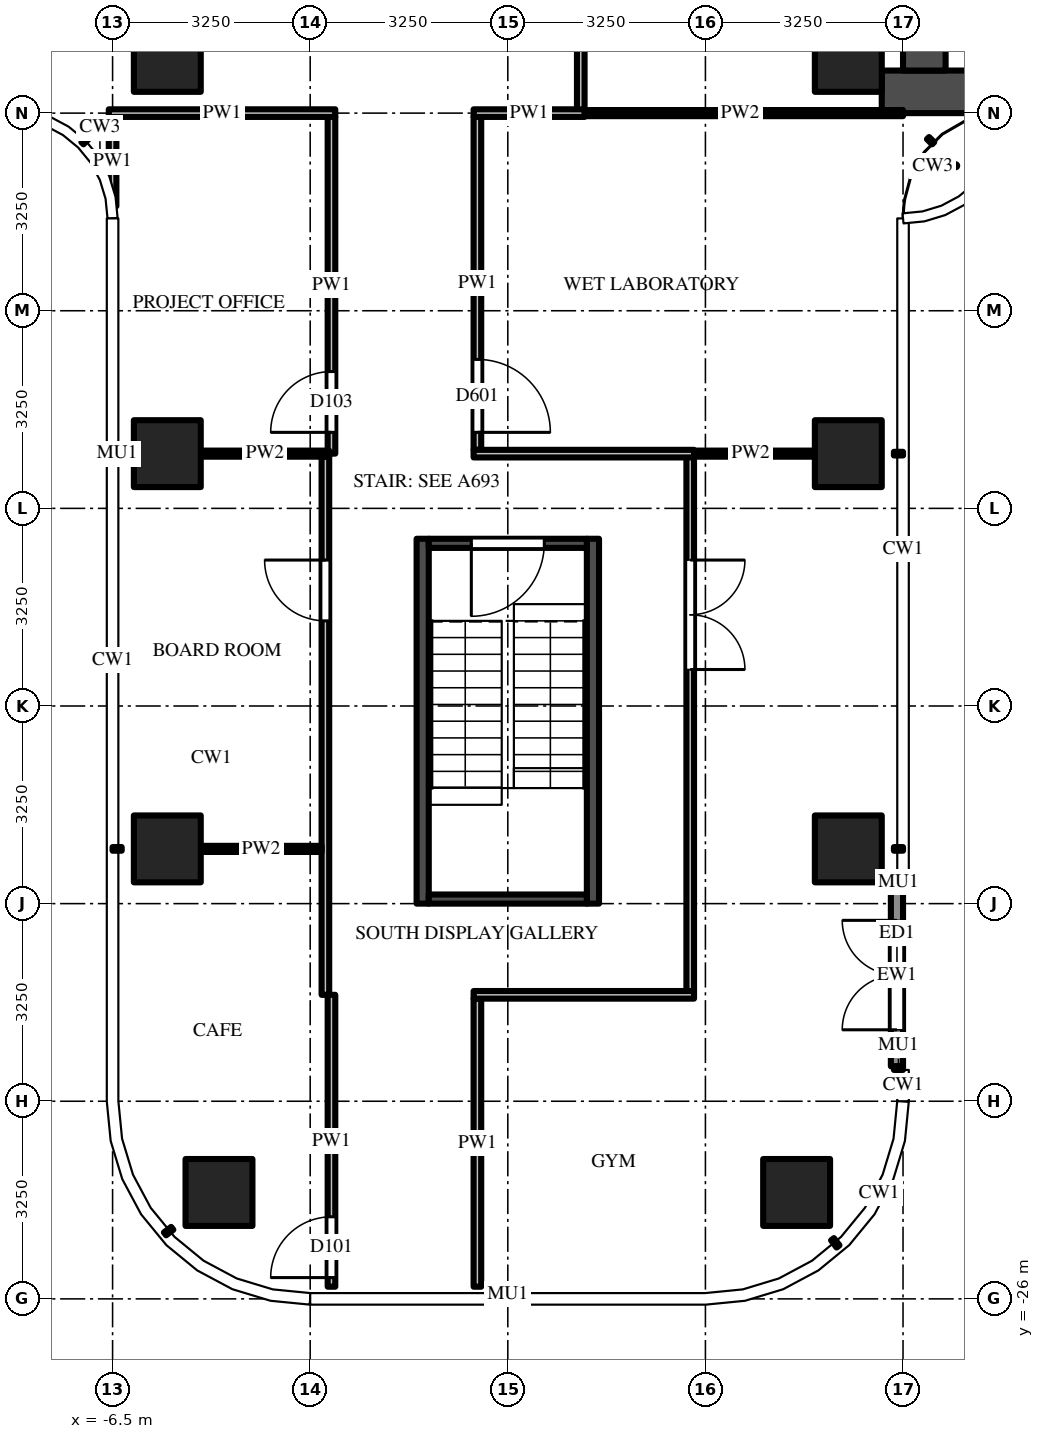
"""IFC4 building model, lengths in metres.
Left out: names, types, materials, properties, quantities, classifications, styles, units other than length and angle.
Written with IfcOpenShell. Run it as: python <this file> out.ifc"""

import sys

from ifc_helpers import new_model, si_unit, direction, frame, frame_2d, origin, origin_2d, place, context, subcontext, project, spatial, rectangle, extrude, source, transform, mapped, element, fill, save


model = new_model("IFC4")
c1 = context("Model", 3, precision=1e-05, world=origin(), true_north=direction((0.0, 1.0)))
c2 = subcontext(c1, "Body", "Model", "MODEL_VIEW")
j1 = project(units=[si_unit("LENGTHUNIT", "METRE"), si_unit("PLANEANGLEUNIT", "RADIAN")], contexts=[c1])
p1 = place(None, origin())
s1 = spatial("IfcSite", under=j1, at=p1, CompositionType="ELEMENT")
p2 = place(p1, origin())
s2 = spatial("IfcBuilding", under=s1, at=p2, CompositionType="ELEMENT")
p3 = place(p2, frame((0.0, 0.0, 236.3)))
s3 = spatial("IfcBuildingStorey", under=s2, at=p3, CompositionType="ELEMENT", Elevation=236.3)
m1 = source(origin(), c2, "Body", "SweptSolid", [
    extrude(rectangle(XDim=1.1, YDim=1.1, at=origin_2d()), origin(), (0.0, 0.0, 1.0), 3.9),
])
for number, where, z_axis, x_axis in (
    (1, (5.6, -5.6, 0.0), (0.0, 0.0, 1.0), (1.0, 0.0, 0.0)),
    (2, (-5.6, -5.6, 0.0), (0.0, 0.0, 1.0), (1.0, 0.0, 0.0)),
    (3, (5.6, -12.1, 0.0), (0.0, 0.0, 1.0), (1.0, 0.0, 0.0)),
    (4, (5.6, -18.6, 0.0), (0.0, 0.0, 1.0), (1.0, 0.0, 0.0)),
    (5, (4.75, -24.25, 0.0), (0.0, 0.0, 1.0), (1.0, 0.0, 0.0)),
    (6, (-5.6, -12.1, 0.0), (0.0, 0.0, 1.0), (1.0, 0.0, 0.0)),
    (7, (-5.6, -18.6, 0.0), (0.0, 0.0, 1.0), (1.0, 0.0, 0.0)),
    (8, (-4.75, -24.25, 0.0), (0.0, 0.0, 1.0), (1.0, 0.0, 0.0)),
):
    element("IfcColumn", number, at=place(p3, frame(where, z_axis=z_axis, x_axis=x_axis)), inside=s3, PredefinedType="COLUMN", context=c2, shape_type="MappedRepresentation", body=[
        mapped(m1, transform((0.0, 0.0, 0.0))),
    ])
m2 = source(origin(), c2, "Body", "SweptSolid", [
    extrude(rectangle(XDim=16.6, YDim=0.7, at=frame_2d((8.3, 0.0))), origin(), (0.0, 0.0, 1.0), 3.7),
])
p4 = place(p3, frame((6.15, -6.15, 0.0), z_axis=(0.0, 0.0, 1.0), x_axis=(1.0, 0.0, 0.0)))
e9 = element("IfcWall", 9, at=p4, inside=s3, PredefinedType="SHEAR", context=c2, shape_type="MappedRepresentation", body=[
    mapped(m2, transform((0.0, 0.0, 0.0))),
])
m3 = source(origin(), c2, "Body", "SweptSolid", [
    extrude(rectangle(XDim=9.05, YDim=0.7, at=frame_2d((4.525, 0.0))), origin(), (0.0, 0.0, 1.0), 3.7),
])
p5 = place(p3, frame((6.85, -5.8, 0.0), z_axis=(0.0, 0.0, 1.0), x_axis=(0.0, 1.0, 0.0)))
e10 = element("IfcWall", 10, at=p5, inside=s3, PredefinedType="SHEAR", context=c2, shape_type="MappedRepresentation", body=[
    mapped(m3, transform((0.0, 0.0, 0.0))),
])
m4 = source(origin(), c2, "Body", "SweptSolid", [
    extrude(rectangle(XDim=1.8, YDim=2.1, at=frame_2d((0.9, 1.05))), frame((0.0, 0.36, 0.0), z_axis=(0.0, -1.0, 0.0), x_axis=(1.0, 0.0, 0.0)), (0.0, 0.0, 1.0), 0.72),
])
p6 = place(p5, frame((3.15, 0.0, 0.0)))
e11 = element("IfcOpeningElement", 11, at=p6, cuts=e10, PredefinedType="OPENING", context=c2, shape_type="MappedRepresentation", body=[
    mapped(m4, transform((0.0, 0.0, 0.0))),
])
m5 = source(origin(), c2, "Body", "SweptSolid", [
    extrude(rectangle(XDim=6.0, YDim=0.2, at=frame_2d((3.0, 0.0))), origin(), (0.0, 0.0, 1.0), 3.7),
])
for number, where, z_axis, x_axis in (
    (12, (1.4, -13.5, 0.0), (0.0, 0.0, 1.0), (0.0, -1.0, 0.0)),
    (13, (-1.4, -13.5, 0.0), (0.0, 0.0, 1.0), (0.0, -1.0, 0.0)),
):
    element("IfcWall", number, at=place(p3, frame(where, z_axis=z_axis, x_axis=x_axis)), inside=s3, PredefinedType="SHEAR", context=c2, shape_type="MappedRepresentation", body=[
        mapped(m5, transform((0.0, 0.0, 0.0))),
    ])
m6 = source(origin(), c2, "Body", "SweptSolid", [
    extrude(rectangle(XDim=2.6, YDim=0.15, at=frame_2d((1.3, 0.0))), origin(), (0.0, 0.0, 1.0), 3.7),
])
p7 = place(p3, frame((1.3, -13.575, 0.0), z_axis=(0.0, 0.0, 1.0), x_axis=(-1.0, 0.0, 0.0)))
e14 = element("IfcWall", 14, at=p7, inside=s3, PredefinedType="SHEAR", context=c2, shape_type="MappedRepresentation", body=[
    mapped(m6, transform((0.0, 0.0, 0.0))),
])
m7 = source(origin(), c2, "Body", "SweptSolid", [
    extrude(rectangle(XDim=1.2, YDim=2.1, at=frame_2d((0.6, 1.05))), frame((0.0, 0.085, 0.0), z_axis=(0.0, -1.0, 0.0), x_axis=(1.0, 0.0, 0.0)), (0.0, 0.0, 1.0), 0.17),
])
p8 = place(p7, frame((0.7, 0.0, 0.0)))
e15 = element("IfcOpeningElement", 15, at=p8, cuts=e14, PredefinedType="OPENING", context=c2, shape_type="MappedRepresentation", body=[
    mapped(m7, transform((0.0, 0.0, 0.0))),
])
p9 = place(p3, frame((1.3, -19.425, 0.0), z_axis=(0.0, 0.0, 1.0), x_axis=(-1.0, 0.0, 0.0)))
e16 = element("IfcWall", 16, at=p9, inside=s3, PredefinedType="SHEAR", context=c2, shape_type="MappedRepresentation", body=[
    mapped(m6, transform((0.0, 0.0, 0.0))),
])
m8 = source(origin(), c2, "Body", "SweptSolid", [
    extrude(rectangle(XDim=3.0, YDim=0.2, at=frame_2d((1.5, 0.0))), origin(), (0.0, 0.0, 1.0), 3.7),
])
p10 = place(p3, frame((6.4, -22.175, 0.0), z_axis=(0.0, 0.0, 1.0), x_axis=(0.0, 1.0, 0.0)))
e17 = element("IfcWall", 17, at=p10, inside=s3, PredefinedType="SOLIDWALL", context=c2, shape_type="MappedRepresentation", body=[
    mapped(m8, transform((0.0, 0.0, 0.0))),
])
m9 = source(origin(), c2, "Body", "SweptSolid", [
    extrude(rectangle(XDim=1.8, YDim=2.4, at=frame_2d((0.9, 1.2))), frame((0.0, 0.11, 0.0), z_axis=(0.0, -1.0, 0.0), x_axis=(1.0, 0.0, 0.0)), (0.0, 0.0, 1.0), 0.22),
])
p11 = place(p10, frame((0.6, 0.0, 0.0)))
e18 = element("IfcOpeningElement", 18, at=p11, cuts=e17, PredefinedType="OPENING", context=c2, shape_type="MappedRepresentation", body=[
    mapped(m9, transform((0.0, 0.0, 0.0))),
])
m10 = source(origin(), c2, "Body", "SweptSolid", [
    extrude(rectangle(XDim=1.469, YDim=0.125, at=frame_2d((0.734, 0.0))), origin(), (0.0, 0.0, 1.0), 3.7),
])
p12 = place(p3, frame((-6.5, -6.562, 0.0), z_axis=(0.0, 0.0, 1.0), x_axis=(0.0, -1.0, 0.0)))
e19 = element("IfcWall", 19, at=p12, inside=s3, PredefinedType="PARTITIONING", context=c2, shape_type="MappedRepresentation", body=[
    mapped(m10, transform((0.0, 0.0, 0.0))),
])
m11 = source(origin(), c2, "Body", "SweptSolid", [
    extrude(rectangle(XDim=8.85, YDim=0.125, at=frame_2d((4.425, 0.0))), origin(), (0.0, 0.0, 1.0), 2.996),
])
p13 = place(p3, frame((-3.0, -21.0, 0.0), z_axis=(0.0, 0.0, 1.0), x_axis=(0.0, 1.0, 0.0)))
e20 = element("IfcWall", 20, at=p13, inside=s3, PredefinedType="PARTITIONING", context=c2, shape_type="MappedRepresentation", body=[
    mapped(m11, transform((0.0, 0.0, 0.0))),
])
m12 = source(origin(), c2, "Body", "SweptSolid", [
    extrude(rectangle(XDim=1.0, YDim=2.1, at=frame_2d((0.5, 1.05))), frame((0.0, 0.073, 0.0), z_axis=(0.0, -1.0, 0.0), x_axis=(1.0, 0.0, 0.0)), (0.0, 0.0, 1.0), 0.145),
])
p14 = place(p13, frame((6.15, 0.0, 0.0)))
e21 = element("IfcOpeningElement", 21, at=p14, cuts=e20, PredefinedType="OPENING", context=c2, shape_type="MappedRepresentation", body=[
    mapped(m12, transform((0.0, 0.0, 0.0))),
])
m13 = source(origin(), c2, "Body", "SweptSolid", [
    extrude(rectangle(XDim=4.8, YDim=0.125, at=frame_2d((2.4, 0.0))), origin(), (0.0, 0.0, 1.0), 2.78),
])
p15 = place(p3, frame((-2.9, -25.8, 0.0), z_axis=(0.0, 0.0, 1.0), x_axis=(0.0, 1.0, 0.0)))
e22 = element("IfcWall", 22, at=p15, inside=s3, PredefinedType="PARTITIONING", context=c2, shape_type="MappedRepresentation", body=[
    mapped(m13, transform((0.0, 0.0, 0.0))),
])
p16 = place(p15, frame((0.15, 0.0, 0.0)))
e23 = element("IfcOpeningElement", 23, at=p16, cuts=e22, PredefinedType="OPENING", context=c2, shape_type="MappedRepresentation", body=[
    mapped(m12, transform((0.0, 0.0, 0.0))),
])
m14 = source(origin(), c2, "Body", "SweptSolid", [
    extrude(rectangle(XDim=5.538, YDim=0.125, at=frame_2d((2.769, 0.0))), origin(), (0.0, 0.0, 1.0), 2.996),
])
p17 = place(p3, frame((-2.9, -12.1, 0.0), z_axis=(0.0, 0.0, 1.0), x_axis=(0.0, 1.0, 0.0)))
e24 = element("IfcWall", 24, at=p17, inside=s3, PredefinedType="PARTITIONING", context=c2, shape_type="MappedRepresentation", body=[
    mapped(m14, transform((0.0, 0.0, 0.0))),
])
p18 = place(p17, frame((0.35, 0.0, 0.0)))
e25 = element("IfcOpeningElement", 25, at=p18, cuts=e24, PredefinedType="OPENING", context=c2, shape_type="MappedRepresentation", body=[
    mapped(m12, transform((0.0, 0.0, 0.0))),
])
m15 = source(origin(), c2, "Body", "SweptSolid", [
    extrude(rectangle(XDim=4.738, YDim=0.125, at=frame_2d((2.369, 0.0))), origin(), (0.0, 0.0, 1.0), 2.78),
])
p19 = place(p3, frame((-0.5, -21.062, 0.0), z_axis=(0.0, 0.0, 1.0), x_axis=(0.0, -1.0, 0.0)))
e26 = element("IfcWall", 26, at=p19, inside=s3, PredefinedType="PARTITIONING", context=c2, shape_type="MappedRepresentation", body=[
    mapped(m15, transform((0.0, 0.0, 0.0))),
])
m16 = source(origin(), c2, "Body", "SweptSolid", [
    extrude(rectangle(XDim=5.475, YDim=0.125, at=frame_2d((2.738, 0.0))), origin(), (0.0, 0.0, 1.0), 2.996),
])
p20 = place(p3, frame((-0.5, -6.562, 0.0), z_axis=(0.0, 0.0, 1.0), x_axis=(0.0, -1.0, 0.0)))
e27 = element("IfcWall", 27, at=p20, inside=s3, PredefinedType="PARTITIONING", context=c2, shape_type="MappedRepresentation", body=[
    mapped(m16, transform((0.0, 0.0, 0.0))),
])
m17 = source(origin(), c2, "Body", "SweptSolid", [
    extrude(rectangle(XDim=1.2, YDim=2.1, at=frame_2d((0.6, 1.05))), frame((0.0, 0.073, 0.0), z_axis=(0.0, -1.0, 0.0), x_axis=(1.0, 0.0, 0.0)), (0.0, 0.0, 1.0), 0.145),
])
p21 = place(p20, frame((3.988, 0.0, 0.0)))
e28 = element("IfcOpeningElement", 28, at=p21, cuts=e27, PredefinedType="OPENING", context=c2, shape_type="MappedRepresentation", body=[
    mapped(m17, transform((0.0, 0.0, 0.0))),
])
m18 = source(origin(), c2, "Body", "SweptSolid", [
    extrude(rectangle(XDim=3.137, YDim=0.125, at=frame_2d((1.569, 0.0))), origin(), (0.0, 0.0, 1.0), 2.996),
])
p22 = place(p3, frame((1.2, -3.312, 0.0), z_axis=(0.0, 0.0, 1.0), x_axis=(0.0, -1.0, 0.0)))
e29 = element("IfcWall", 29, at=p22, inside=s3, PredefinedType="PARTITIONING", context=c2, shape_type="MappedRepresentation", body=[
    mapped(m18, transform((0.0, 0.0, 0.0))),
])
p23 = place(p3, frame((3.0, -12.15, 0.0), z_axis=(0.0, 0.0, 1.0), x_axis=(0.0, -1.0, 0.0)))
e30 = element("IfcWall", 30, at=p23, inside=s3, PredefinedType="PARTITIONING", context=c2, shape_type="SweptSolid", body=[
    extrude(rectangle(XDim=8.788, YDim=0.125, at=frame_2d((4.394, 0.0))), origin(), (0.0, 0.0, 1.0), 2.996),
])
m19 = source(origin(), c2, "Body", "SweptSolid", [
    extrude(rectangle(XDim=1.8, YDim=2.1, at=frame_2d((0.9, 1.05))), frame((0.0, 0.073, 0.0), z_axis=(0.0, -1.0, 0.0), x_axis=(1.0, 0.0, 0.0)), (0.0, 0.0, 1.0), 0.145),
])
p24 = place(p23, frame((1.7, 0.0, 0.0)))
e31 = element("IfcOpeningElement", 31, at=p24, cuts=e30, PredefinedType="OPENING", context=c2, shape_type="MappedRepresentation", body=[
    mapped(m19, transform((0.0, 0.0, 0.0))),
])
m20 = source(origin(), c2, "Body", "SweptSolid", [
    extrude(rectangle(XDim=3.625, YDim=0.125, at=frame_2d((1.812, 0.0))), origin(), (0.0, 0.0, 1.0), 3.7),
])
p25 = place(p3, frame((3.062, -21.0, 0.0), z_axis=(0.0, 0.0, 1.0), x_axis=(-1.0, 0.0, 0.0)))
e32 = element("IfcWall", 32, at=p25, inside=s3, PredefinedType="PARTITIONING", context=c2, shape_type="MappedRepresentation", body=[
    mapped(m20, transform((0.0, 0.0, 0.0))),
])
p26 = place(p3, frame((-5.05, -18.6, 0.0), z_axis=(0.0, 0.0, 1.0), x_axis=(1.0, 0.0, 0.0)))
e33 = element("IfcWall", 33, at=p26, inside=s3, PredefinedType="PARTITIONING", context=c2, shape_type="SweptSolid", body=[
    extrude(rectangle(XDim=1.988, YDim=0.1, at=frame_2d((0.994, 0.0))), origin(), (0.0, 0.0, 1.0), 3.223),
])
m21 = source(origin(), c2, "Body", "SweptSolid", [
    extrude(rectangle(XDim=2.113, YDim=0.1, at=frame_2d((1.056, 0.0))), origin(), (0.0, 0.0, 1.0), 2.996),
])
for number, where, z_axis, x_axis in (
    (34, (-5.05, -12.1, 0.0), (0.0, 0.0, 1.0), (1.0, 0.0, 0.0)),
    (35, (2.938, -12.1, 0.0), (0.0, 0.0, 1.0), (1.0, 0.0, 0.0)),
):
    element("IfcWall", number, at=place(p3, frame(where, z_axis=z_axis, x_axis=x_axis)), inside=s3, PredefinedType="PARTITIONING", context=c2, shape_type="MappedRepresentation", body=[
        mapped(m21, transform((0.0, 0.0, 0.0))),
    ])
m22 = source(origin(), c2, "Body", "SweptSolid", [
    extrude(rectangle(XDim=3.625, YDim=0.125, at=frame_2d((1.812, 0.0))), origin(), (0.0, 0.0, 1.0), 2.996),
])
p27 = place(p3, frame((-0.562, -12.1, 0.0), z_axis=(0.0, 0.0, 1.0), x_axis=(1.0, 0.0, 0.0)))
e36 = element("IfcWall", 36, at=p27, inside=s3, PredefinedType="PARTITIONING", context=c2, shape_type="MappedRepresentation", body=[
    mapped(m22, transform((0.0, 0.0, 0.0))),
])
m23 = source(origin(), c2, "Body", "SweptSolid", [
    extrude(rectangle(XDim=5.363, YDim=0.1, at=frame_2d((2.681, 0.0))), origin(), (0.0, 0.0, 1.0), 2.78),
])
p28 = place(p3, frame((1.137, -6.5, 0.0), z_axis=(0.0, 0.0, 1.0), x_axis=(1.0, 0.0, 0.0)))
e37 = element("IfcWall", 37, at=p28, inside=s3, PredefinedType="PARTITIONING", context=c2, shape_type="MappedRepresentation", body=[
    mapped(m23, transform((0.0, 0.0, 0.0))),
])
m24 = source(origin(), c2, "Body", "SweptSolid", [
    extrude(rectangle(XDim=3.725, YDim=0.125, at=frame_2d((1.863, 0.0))), origin(), (0.0, 0.0, 1.0), 2.78),
])
p29 = place(p3, frame((-2.837, -6.5, 0.0), z_axis=(0.0, 0.0, 1.0), x_axis=(-1.0, 0.0, 0.0)))
e38 = element("IfcWall", 38, at=p29, inside=s3, PredefinedType="PARTITIONING", context=c2, shape_type="MappedRepresentation", body=[
    mapped(m24, transform((0.0, 0.0, 0.0))),
])
m25 = source(origin(), c2, "Body", "SweptSolid", [
    extrude(rectangle(XDim=1.825, YDim=0.125, at=frame_2d((0.913, 0.0))), origin(), (0.0, 0.0, 1.0), 3.7),
])
p30 = place(p3, frame((1.262, -6.5, 0.0), z_axis=(0.0, 0.0, 1.0), x_axis=(-1.0, 0.0, 0.0)))
e39 = element("IfcWall", 39, at=p30, inside=s3, PredefinedType="PARTITIONING", context=c2, shape_type="MappedRepresentation", body=[
    mapped(m25, transform((0.0, 0.0, 0.0))),
])
m26 = source(origin(), c2, "Body", "SweptSolid", [
    extrude(rectangle(XDim=1.2, YDim=2.1, at=frame_2d((0.6, 1.05))), frame((0.0, 0.025, 0.0), z_axis=(0.0, -1.0, 0.0), x_axis=(1.0, 0.0, 0.0)), (0.0, 0.0, 1.0), 0.05),
])
p31 = place(p8, origin())
e40 = element("IfcDoor", 40, at=p31, inside=s3, OperationType="SINGLE_SWING_RIGHT", PredefinedType="DOOR", context=c2, shape_type="MappedRepresentation", body=[
    mapped(m26, transform((0.0, 0.0, 0.0))),
])
fill(e15, e40)
m27 = source(origin(), c2, "Body", "SweptSolid", [
    extrude(rectangle(XDim=1.8, YDim=2.4, at=frame_2d((0.9, 1.2))), frame((0.0, 0.025, 0.0), z_axis=(0.0, -1.0, 0.0), x_axis=(1.0, 0.0, 0.0)), (0.0, 0.0, 1.0), 0.05),
])
p32 = place(p11, origin())
e41 = element("IfcDoor", 41, at=p32, inside=s3, OperationType="DOUBLE_DOOR_SINGLE_SWING", PredefinedType="DOOR", context=c2, shape_type="MappedRepresentation", body=[
    mapped(m27, transform((0.0, 0.0, 0.0))),
])
fill(e18, e41)
m28 = source(origin(), c2, "Body", "SweptSolid", [
    extrude(rectangle(XDim=1.0, YDim=2.1, at=frame_2d((0.5, 1.05))), frame((0.0, 0.025, 0.0), z_axis=(0.0, -1.0, 0.0), x_axis=(1.0, 0.0, 0.0)), (0.0, 0.0, 1.0), 0.05),
])
p33 = place(p16, origin())
e42 = element("IfcDoor", 42, at=p33, inside=s3, OperationType="SINGLE_SWING_LEFT", PredefinedType="DOOR", context=c2, shape_type="MappedRepresentation", body=[
    mapped(m28, transform((0.0, 0.0, 0.0))),
])
fill(e23, e42)
m29 = source(origin(), c2, "Body", "SweptSolid", [
    extrude(rectangle(XDim=1.8, YDim=2.1, at=frame_2d((0.9, 1.05))), frame((0.0, 0.025, 0.0), z_axis=(0.0, -1.0, 0.0), x_axis=(1.0, 0.0, 0.0)), (0.0, 0.0, 1.0), 0.05),
])
p34 = place(p24, origin())
e43 = element("IfcDoor", 43, at=p34, inside=s3, OperationType="DOUBLE_DOOR_SINGLE_SWING", PredefinedType="DOOR", context=c2, shape_type="MappedRepresentation", body=[
    mapped(m29, transform((0.0, 0.0, 0.0))),
])
fill(e31, e43)
p35 = place(p14, origin())
e44 = element("IfcDoor", 44, at=p35, inside=s3, OperationType="SINGLE_SWING_RIGHT", PredefinedType="DOOR", context=c2, shape_type="MappedRepresentation", body=[
    mapped(m28, transform((0.0, 0.0, 0.0))),
])
fill(e21, e44)
p36 = place(p18, origin())
e45 = element("IfcDoor", 45, at=p36, inside=s3, OperationType="SINGLE_SWING_LEFT", PredefinedType="DOOR", context=c2, shape_type="MappedRepresentation", body=[
    mapped(m28, transform((0.0, 0.0, 0.0))),
])
fill(e25, e45)
p37 = place(p21, origin())
e46 = element("IfcDoor", 46, at=p37, inside=s3, OperationType="SINGLE_SWING_RIGHT", PredefinedType="DOOR", context=c2, shape_type="MappedRepresentation", body=[
    mapped(m26, transform((0.0, 0.0, 0.0))),
])
fill(e28, e46)
save(model, sys.argv[1])
